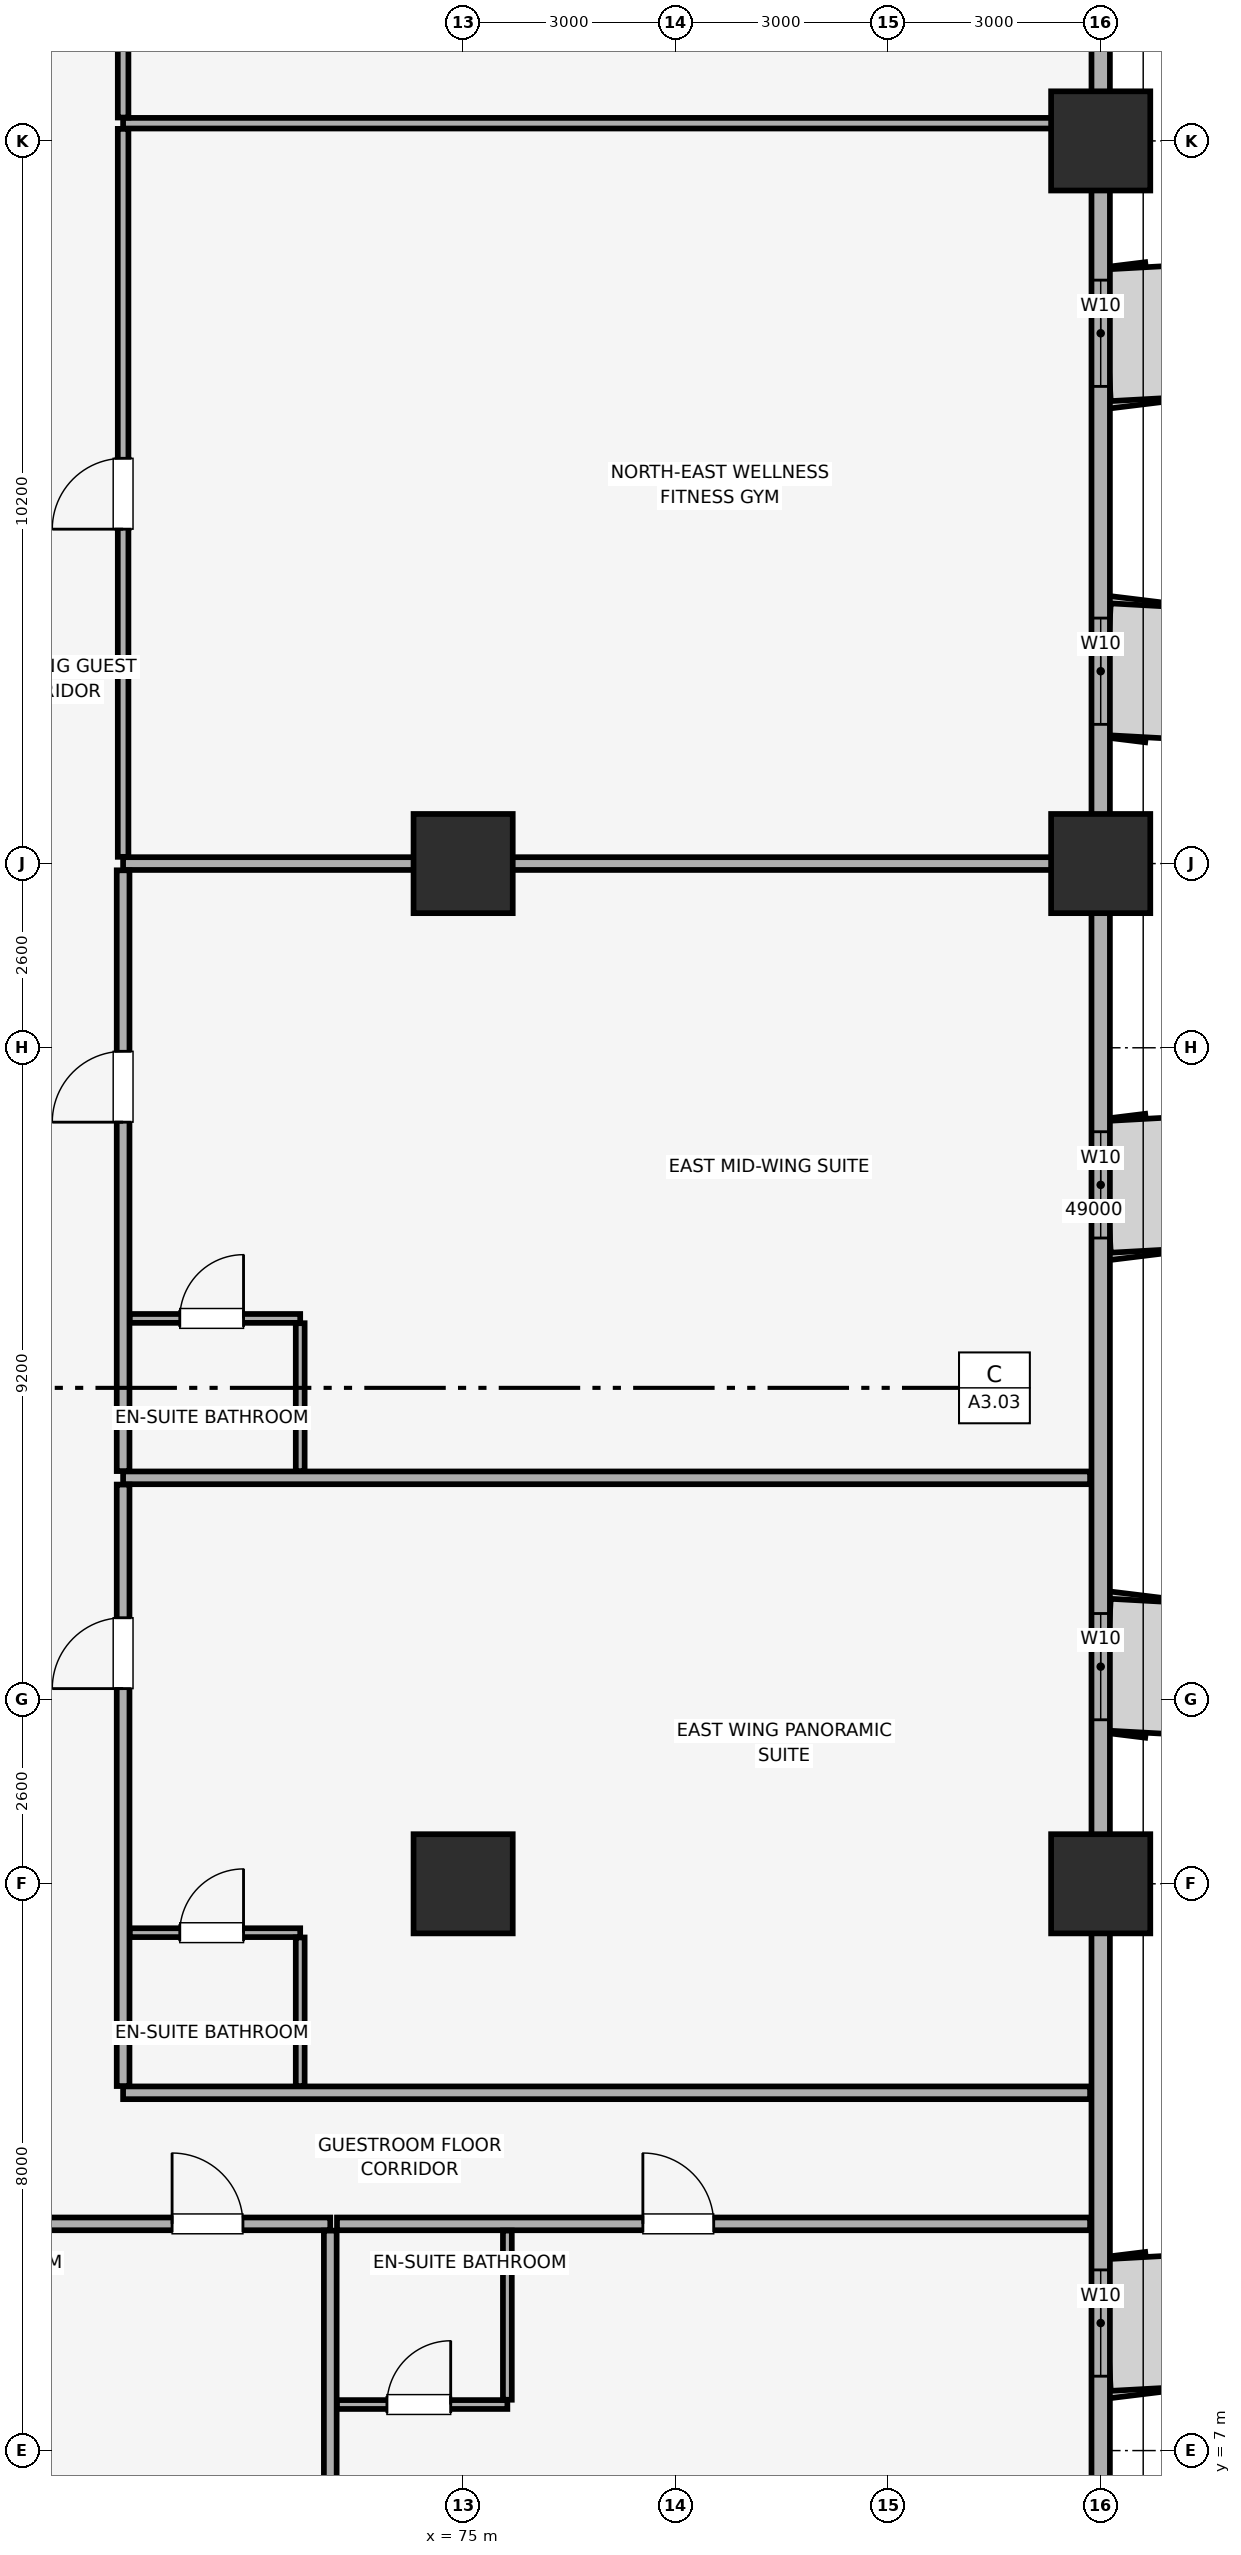
"""IFC4 building model, lengths in metres.
Left out: names, types, materials, properties, quantities, classifications, styles, units other than length and angle.
Written with IfcOpenShell. Run it as: python <this file> out.ifc"""

import sys

from ifc_helpers import new_model, si_unit, direction, frame, frame_2d, origin, origin_2d, place, context, subcontext, project, spatial, rectangle, extrude, element, fill, save


model = new_model("IFC4")
c1 = context("Model", 3, precision=1e-05, world=origin(), true_north=direction((0.0, 1.0)))
c2 = subcontext(c1, "Body", "Model", "MODEL_VIEW")
j1 = project(units=[si_unit("LENGTHUNIT", "METRE"), si_unit("PLANEANGLEUNIT", "RADIAN")], contexts=[c1])
p1 = place(None, origin())
s1 = spatial("IfcSite", under=j1, at=p1, CompositionType="ELEMENT")
p2 = place(p1, origin())
s2 = spatial("IfcBuilding", under=s1, at=p2, CompositionType="ELEMENT")
p3 = place(p2, frame((0.0, 0.0, 46.4)))
s3 = spatial("IfcBuildingStorey", under=s2, at=p3, CompositionType="ELEMENT", Elevation=46.4)
for number, where, z_axis, x_axis in (
    (1, (84.0, 15.0, 0.0), (0.0, 0.0, 1.0), (1.0, 0.0, 0.0)),
    (2, (84.0, 29.4, 0.0), (0.0, 0.0, 1.0), (1.0, 0.0, 0.0)),
    (3, (84.0, 39.6, 0.0), (0.0, 0.0, 1.0), (1.0, 0.0, 0.0)),
    (4, (75.0, 15.0, 0.0), (0.0, 0.0, 1.0), (1.0, 0.0, 0.0)),
    (5, (75.0, 29.4, 0.0), (0.0, 0.0, 1.0), (1.0, 0.0, 0.0)),
):
    element("IfcColumn", number, at=place(p3, frame(where, z_axis=z_axis, x_axis=x_axis)), inside=s3, PredefinedType="COLUMN", context=c2, shape_type="SweptSolid", body=[
        extrude(rectangle(XDim=1.4, YDim=1.4, at=origin_2d()), origin(), (0.0, 0.0, 1.0), 3.51),
    ])
p4 = place(p3, frame((84.0, 4.2, 0.0), z_axis=(0.0, 0.0, 1.0), x_axis=(0.0, 1.0, 0.0)))
e6 = element("IfcWall", 6, at=p4, inside=s3, PredefinedType="SOLIDWALL", context=c2, shape_type="SweptSolid", body=[
    extrude(rectangle(XDim=40.6, YDim=0.26, at=frame_2d((20.3, 0.0))), origin(), (0.0, 0.0, 1.0), 2.56),
])
p5 = place(p4, frame((3.85, 0.0, 0.85)))
e7 = element("IfcOpeningElement", 7, at=p5, cuts=e6, PredefinedType="OPENING", context=c2, shape_type="SweptSolid", body=[
    extrude(rectangle(XDim=1.5, YDim=1.4, at=frame_2d((0.75, 0.7))), frame((0.0, 0.14, 0.0), z_axis=(0.0, -1.0, 0.0), x_axis=(1.0, 0.0, 0.0)), (0.0, 0.0, 1.0), 0.28),
])
p6 = place(p4, frame((13.115, 0.0, 0.85)))
e8 = element("IfcOpeningElement", 8, at=p6, cuts=e6, PredefinedType="OPENING", context=c2, shape_type="SweptSolid", body=[
    extrude(rectangle(XDim=1.5, YDim=1.4, at=frame_2d((0.75, 0.7))), frame((0.0, 0.14, 0.0), z_axis=(0.0, -1.0, 0.0), x_axis=(1.0, 0.0, 0.0)), (0.0, 0.0, 1.0), 0.28),
])
p7 = place(p4, frame((19.915, 0.0, 0.85)))
e9 = element("IfcOpeningElement", 9, at=p7, cuts=e6, PredefinedType="OPENING", context=c2, shape_type="SweptSolid", body=[
    extrude(rectangle(XDim=1.5, YDim=1.4, at=frame_2d((0.75, 0.7))), frame((0.0, 0.14, 0.0), z_axis=(0.0, -1.0, 0.0), x_axis=(1.0, 0.0, 0.0)), (0.0, 0.0, 1.0), 0.28),
])
p8 = place(p4, frame((27.165, 0.0, 0.85)))
e10 = element("IfcOpeningElement", 10, at=p8, cuts=e6, PredefinedType="OPENING", context=c2, shape_type="SweptSolid", body=[
    extrude(rectangle(XDim=1.5, YDim=1.4, at=frame_2d((0.75, 0.7))), frame((0.0, 0.14, 0.0), z_axis=(0.0, -1.0, 0.0), x_axis=(1.0, 0.0, 0.0)), (0.0, 0.0, 1.0), 0.28),
])
p9 = place(p4, frame((31.935, 0.0, 0.85)))
e11 = element("IfcOpeningElement", 11, at=p9, cuts=e6, PredefinedType="OPENING", context=c2, shape_type="SweptSolid", body=[
    extrude(rectangle(XDim=1.5, YDim=1.4, at=frame_2d((0.75, 0.7))), frame((0.0, 0.14, 0.0), z_axis=(0.0, -1.0, 0.0), x_axis=(1.0, 0.0, 0.0)), (0.0, 0.0, 1.0), 0.28),
])
p10 = place(p4, frame((37.365, 0.0, 0.85)))
e12 = element("IfcOpeningElement", 12, at=p10, cuts=e6, PredefinedType="OPENING", context=c2, shape_type="SweptSolid", body=[
    extrude(rectangle(XDim=1.5, YDim=1.4, at=frame_2d((0.75, 0.7))), frame((0.0, 0.14, 0.0), z_axis=(0.0, -1.0, 0.0), x_axis=(1.0, 0.0, 0.0)), (0.0, 0.0, 1.0), 0.28),
])
p11 = place(p3, frame((66.794, 10.2, 0.0), z_axis=(0.0, 0.0, 1.0), x_axis=(1.0, 0.0, 0.0)))
e13 = element("IfcWall", 13, at=p11, inside=s3, PredefinedType="PARTITIONING", context=c2, shape_type="SweptSolid", body=[
    extrude(rectangle(XDim=6.331, YDim=0.18, at=frame_2d((3.165, 0.0))), origin(), (0.0, 0.0, 1.0), 3.51),
])
p12 = place(p11, frame((4.098, 0.0, 0.0)))
e14 = element("IfcOpeningElement", 14, at=p12, cuts=e13, PredefinedType="OPENING", context=c2, shape_type="SweptSolid", body=[
    extrude(rectangle(XDim=1.0, YDim=2.15, at=frame_2d((0.5, 1.075))), frame((0.0, 0.1, 0.0), z_axis=(0.0, -1.0, 0.0), x_axis=(1.0, 0.0, 0.0)), (0.0, 0.0, 1.0), 0.2),
])
p13 = place(p3, frame((73.124, 0.15, 0.0), z_axis=(0.0, 0.0, 1.0), x_axis=(0.0, 1.0, 0.0)))
e15 = element("IfcWall", 15, at=p13, inside=s3, PredefinedType="PARTITIONING", context=c2, shape_type="SweptSolid", body=[
    extrude(rectangle(XDim=9.955, YDim=0.18, at=frame_2d((4.978, 0.0))), origin(), (0.0, 0.0, 1.0), 3.51),
])
p14 = place(p3, frame((73.219, 10.2, 0.0), z_axis=(0.0, 0.0, 1.0), x_axis=(1.0, 0.0, 0.0)))
e16 = element("IfcWall", 16, at=p14, inside=s3, PredefinedType="PARTITIONING", context=c2, shape_type="SweptSolid", body=[
    extrude(rectangle(XDim=10.631, YDim=0.18, at=frame_2d((5.315, 0.0))), origin(), (0.0, 0.0, 1.0), 3.51),
])
p15 = place(p14, frame((4.318, 0.0, 0.0)))
e17 = element("IfcOpeningElement", 17, at=p15, cuts=e16, PredefinedType="OPENING", context=c2, shape_type="SweptSolid", body=[
    extrude(rectangle(XDim=1.0, YDim=2.15, at=frame_2d((0.5, 1.075))), frame((0.0, 0.1, 0.0), z_axis=(0.0, -1.0, 0.0), x_axis=(1.0, 0.0, 0.0)), (0.0, 0.0, 1.0), 0.2),
])
p16 = place(p3, frame((73.219, 7.65, 0.0), z_axis=(0.0, 0.0, 1.0), x_axis=(1.0, 0.0, 0.0)))
e18 = element("IfcWall", 18, at=p16, inside=s3, PredefinedType="PARTITIONING", context=c2, shape_type="SweptSolid", body=[
    extrude(rectangle(XDim=2.405, YDim=0.125, at=frame_2d((1.203, 0.0))), origin(), (0.0, 0.0, 1.0), 3.51),
])
p17 = place(p16, frame((0.705, 0.0, 0.0)))
e19 = element("IfcOpeningElement", 19, at=p17, cuts=e18, PredefinedType="OPENING", context=c2, shape_type="SweptSolid", body=[
    extrude(rectangle(XDim=0.9, YDim=2.1, at=frame_2d((0.45, 1.05))), frame((0.0, 0.073, 0.0), z_axis=(0.0, -1.0, 0.0), x_axis=(1.0, 0.0, 0.0)), (0.0, 0.0, 1.0), 0.145),
])
p18 = place(p3, frame((75.624, 7.718, 0.0), z_axis=(0.0, 0.0, 1.0), x_axis=(0.0, 1.0, 0.0)))
e20 = element("IfcWall", 20, at=p18, inside=s3, PredefinedType="PARTITIONING", context=c2, shape_type="SweptSolid", body=[
    extrude(rectangle(XDim=2.387, YDim=0.125, at=frame_2d((1.194, 0.0))), origin(), (0.0, 0.0, 1.0), 3.51),
])
for number, where, z_axis, x_axis in (
    (21, (70.2, 12.05, 0.0), (0.0, 0.0, 1.0), (1.0, 0.0, 0.0)),
    (22, (70.2, 20.73, 0.0), (0.0, 0.0, 1.0), (1.0, 0.0, 0.0)),
):
    element("IfcWall", number, at=place(p3, frame(where, z_axis=z_axis, x_axis=x_axis)), inside=s3, PredefinedType="PARTITIONING", context=c2, shape_type="SweptSolid", body=[
        extrude(rectangle(XDim=13.65, YDim=0.18, at=frame_2d((6.825, 0.0))), origin(), (0.0, 0.0, 1.0), 3.51),
    ])
p19 = place(p3, frame((70.2, 12.145, 0.0), z_axis=(0.0, 0.0, 1.0), x_axis=(0.0, 1.0, 0.0)))
e23 = element("IfcWall", 23, at=p19, inside=s3, PredefinedType="PARTITIONING", context=c2, shape_type="SweptSolid", body=[
    extrude(rectangle(XDim=8.49, YDim=0.18, at=frame_2d((4.245, 0.0))), origin(), (0.0, 0.0, 1.0), 3.51),
])
p20 = place(p19, frame((5.61, 0.0, 0.0)))
e24 = element("IfcOpeningElement", 24, at=p20, cuts=e23, PredefinedType="OPENING", context=c2, shape_type="SweptSolid", body=[
    extrude(rectangle(XDim=1.0, YDim=2.15, at=frame_2d((0.5, 1.075))), frame((0.0, 0.1, 0.0), z_axis=(0.0, -1.0, 0.0), x_axis=(1.0, 0.0, 0.0)), (0.0, 0.0, 1.0), 0.2),
])
p21 = place(p3, frame((70.295, 14.31, 0.0), z_axis=(0.0, 0.0, 1.0), x_axis=(1.0, 0.0, 0.0)))
e25 = element("IfcWall", 25, at=p21, inside=s3, PredefinedType="PARTITIONING", context=c2, shape_type="SweptSolid", body=[
    extrude(rectangle(XDim=2.405, YDim=0.125, at=frame_2d((1.203, 0.0))), origin(), (0.0, 0.0, 1.0), 3.51),
])
p22 = place(p21, frame((0.705, 0.0, 0.0)))
e26 = element("IfcOpeningElement", 26, at=p22, cuts=e25, PredefinedType="OPENING", context=c2, shape_type="SweptSolid", body=[
    extrude(rectangle(XDim=0.9, YDim=2.1, at=frame_2d((0.45, 1.05))), frame((0.0, 0.073, 0.0), z_axis=(0.0, -1.0, 0.0), x_axis=(1.0, 0.0, 0.0)), (0.0, 0.0, 1.0), 0.145),
])
p23 = place(p3, frame((72.7, 12.145, 0.0), z_axis=(0.0, 0.0, 1.0), x_axis=(0.0, 1.0, 0.0)))
e27 = element("IfcWall", 27, at=p23, inside=s3, PredefinedType="PARTITIONING", context=c2, shape_type="SweptSolid", body=[
    extrude(rectangle(XDim=2.097, YDim=0.125, at=frame_2d((1.049, 0.0))), origin(), (0.0, 0.0, 1.0), 3.51),
])
p24 = place(p3, frame((70.2, 29.4, 0.0), z_axis=(0.0, 0.0, 1.0), x_axis=(1.0, 0.0, 0.0)))
e28 = element("IfcWall", 28, at=p24, inside=s3, PredefinedType="PARTITIONING", context=c2, shape_type="SweptSolid", body=[
    extrude(rectangle(XDim=13.65, YDim=0.18, at=frame_2d((6.825, 0.0))), origin(), (0.0, 0.0, 1.0), 2.86),
])
p25 = place(p3, frame((70.2, 20.825, 0.0), z_axis=(0.0, 0.0, 1.0), x_axis=(0.0, 1.0, 0.0)))
e29 = element("IfcWall", 29, at=p25, inside=s3, PredefinedType="PARTITIONING", context=c2, shape_type="SweptSolid", body=[
    extrude(rectangle(XDim=8.48, YDim=0.18, at=frame_2d((4.24, 0.0))), origin(), (0.0, 0.0, 1.0), 3.51),
])
p26 = place(p25, frame((4.925, 0.0, 0.0)))
e30 = element("IfcOpeningElement", 30, at=p26, cuts=e29, PredefinedType="OPENING", context=c2, shape_type="SweptSolid", body=[
    extrude(rectangle(XDim=1.0, YDim=2.15, at=frame_2d((0.5, 1.075))), frame((0.0, 0.1, 0.0), z_axis=(0.0, -1.0, 0.0), x_axis=(1.0, 0.0, 0.0)), (0.0, 0.0, 1.0), 0.2),
])
p27 = place(p3, frame((70.295, 22.98, 0.0), z_axis=(0.0, 0.0, 1.0), x_axis=(1.0, 0.0, 0.0)))
e31 = element("IfcWall", 31, at=p27, inside=s3, PredefinedType="PARTITIONING", context=c2, shape_type="SweptSolid", body=[
    extrude(rectangle(XDim=2.405, YDim=0.125, at=frame_2d((1.203, 0.0))), origin(), (0.0, 0.0, 1.0), 3.51),
])
p28 = place(p27, frame((0.705, 0.0, 0.0)))
e32 = element("IfcOpeningElement", 32, at=p28, cuts=e31, PredefinedType="OPENING", context=c2, shape_type="SweptSolid", body=[
    extrude(rectangle(XDim=0.9, YDim=2.1, at=frame_2d((0.45, 1.05))), frame((0.0, 0.073, 0.0), z_axis=(0.0, -1.0, 0.0), x_axis=(1.0, 0.0, 0.0)), (0.0, 0.0, 1.0), 0.145),
])
p29 = place(p3, frame((72.7, 20.825, 0.0), z_axis=(0.0, 0.0, 1.0), x_axis=(0.0, 1.0, 0.0)))
e33 = element("IfcWall", 33, at=p29, inside=s3, PredefinedType="PARTITIONING", context=c2, shape_type="SweptSolid", body=[
    extrude(rectangle(XDim=2.088, YDim=0.125, at=frame_2d((1.044, 0.0))), origin(), (0.0, 0.0, 1.0), 3.51),
])
p30 = place(p3, frame((70.2, 39.85, 0.0), z_axis=(0.0, 0.0, 1.0), x_axis=(1.0, 0.0, 0.0)))
e34 = element("IfcWall", 34, at=p30, inside=s3, PredefinedType="PARTITIONING", context=c2, shape_type="SweptSolid", body=[
    extrude(rectangle(XDim=13.65, YDim=0.15, at=frame_2d((6.825, 0.0))), origin(), (0.0, 0.0, 1.0), 3.51),
])
p31 = place(p3, frame((70.2, 29.495, 0.0), z_axis=(0.0, 0.0, 1.0), x_axis=(0.0, 1.0, 0.0)))
e35 = element("IfcWall", 35, at=p31, inside=s3, PredefinedType="PARTITIONING", context=c2, shape_type="SweptSolid", body=[
    extrude(rectangle(XDim=10.275, YDim=0.15, at=frame_2d((5.137, 0.0))), origin(), (0.0, 0.0, 1.0), 3.51),
])
p32 = place(p31, frame((4.625, 0.0, 0.0)))
e36 = element("IfcOpeningElement", 36, at=p32, cuts=e35, PredefinedType="OPENING", context=c2, shape_type="SweptSolid", body=[
    extrude(rectangle(XDim=1.0, YDim=2.15, at=frame_2d((0.5, 1.075))), frame((0.0, 0.085, 0.0), z_axis=(0.0, -1.0, 0.0), x_axis=(1.0, 0.0, 0.0)), (0.0, 0.0, 1.0), 0.17),
])
p33 = place(p3, frame((70.2, 39.93, 0.0), z_axis=(0.0, 0.0, 1.0), x_axis=(0.0, 1.0, 0.0)))
e37 = element("IfcWall", 37, at=p33, inside=s3, PredefinedType="PARTITIONING", context=c2, shape_type="SweptSolid", body=[
    extrude(rectangle(XDim=8.92, YDim=0.15, at=frame_2d((4.46, 0.0))), origin(), (0.0, 0.0, 1.0), 3.51),
])
p34 = place(p33, frame((1.6, 0.0, 0.0)))
e38 = element("IfcOpeningElement", 38, at=p34, cuts=e37, PredefinedType="OPENING", context=c2, shape_type="SweptSolid", body=[
    extrude(rectangle(XDim=1.0, YDim=2.15, at=frame_2d((0.5, 1.075))), frame((0.0, 0.085, 0.0), z_axis=(0.0, -1.0, 0.0), x_axis=(1.0, 0.0, 0.0)), (0.0, 0.0, 1.0), 0.17),
])
p35 = place(p5, origin())
e39 = element("IfcWindow", 39, at=p35, inside=s3, PartitioningType="SINGLE_PANEL", PredefinedType="WINDOW", context=c2, shape_type="SweptSolid", body=[
    extrude(rectangle(XDim=1.5, YDim=1.4, at=frame_2d((0.75, 0.7))), frame((0.0, 0.03, 0.0), z_axis=(0.0, -1.0, 0.0), x_axis=(1.0, 0.0, 0.0)), (0.0, 0.0, 1.0), 0.06),
])
fill(e7, e39)
p36 = place(p6, origin())
e40 = element("IfcWindow", 40, at=p36, inside=s3, PartitioningType="SINGLE_PANEL", PredefinedType="WINDOW", context=c2, shape_type="SweptSolid", body=[
    extrude(rectangle(XDim=1.5, YDim=1.4, at=frame_2d((0.75, 0.7))), frame((0.0, 0.03, 0.0), z_axis=(0.0, -1.0, 0.0), x_axis=(1.0, 0.0, 0.0)), (0.0, 0.0, 1.0), 0.06),
])
fill(e8, e40)
p37 = place(p7, origin())
e41 = element("IfcWindow", 41, at=p37, inside=s3, PartitioningType="SINGLE_PANEL", PredefinedType="WINDOW", context=c2, shape_type="SweptSolid", body=[
    extrude(rectangle(XDim=1.5, YDim=1.4, at=frame_2d((0.75, 0.7))), frame((0.0, 0.03, 0.0), z_axis=(0.0, -1.0, 0.0), x_axis=(1.0, 0.0, 0.0)), (0.0, 0.0, 1.0), 0.06),
])
fill(e9, e41)
p38 = place(p8, origin())
e42 = element("IfcWindow", 42, at=p38, inside=s3, PartitioningType="SINGLE_PANEL", PredefinedType="WINDOW", context=c2, shape_type="SweptSolid", body=[
    extrude(rectangle(XDim=1.5, YDim=1.4, at=frame_2d((0.75, 0.7))), frame((0.0, 0.03, 0.0), z_axis=(0.0, -1.0, 0.0), x_axis=(1.0, 0.0, 0.0)), (0.0, 0.0, 1.0), 0.06),
])
fill(e10, e42)
p39 = place(p9, origin())
e43 = element("IfcWindow", 43, at=p39, inside=s3, PartitioningType="SINGLE_PANEL", PredefinedType="WINDOW", context=c2, shape_type="SweptSolid", body=[
    extrude(rectangle(XDim=1.5, YDim=1.4, at=frame_2d((0.75, 0.7))), frame((0.0, 0.03, 0.0), z_axis=(0.0, -1.0, 0.0), x_axis=(1.0, 0.0, 0.0)), (0.0, 0.0, 1.0), 0.06),
])
fill(e11, e43)
p40 = place(p12, origin())
e44 = element("IfcDoor", 44, at=p40, inside=s3, OperationType="SINGLE_SWING_LEFT", PredefinedType="DOOR", context=c2, shape_type="SweptSolid", body=[
    extrude(rectangle(XDim=1.0, YDim=2.15, at=frame_2d((0.5, 1.075))), frame((0.0, 0.025, 0.0), z_axis=(0.0, -1.0, 0.0), x_axis=(1.0, 0.0, 0.0)), (0.0, 0.0, 1.0), 0.05),
])
fill(e14, e44)
p41 = place(p15, origin())
e45 = element("IfcDoor", 45, at=p41, inside=s3, OperationType="SINGLE_SWING_LEFT", PredefinedType="DOOR", context=c2, shape_type="SweptSolid", body=[
    extrude(rectangle(XDim=1.0, YDim=2.15, at=frame_2d((0.5, 1.075))), frame((0.0, 0.025, 0.0), z_axis=(0.0, -1.0, 0.0), x_axis=(1.0, 0.0, 0.0)), (0.0, 0.0, 1.0), 0.05),
])
fill(e17, e45)
p42 = place(p17, origin())
e46 = element("IfcDoor", 46, at=p42, inside=s3, OperationType="SINGLE_SWING_RIGHT", PredefinedType="DOOR", context=c2, shape_type="SweptSolid", body=[
    extrude(rectangle(XDim=0.9, YDim=2.1, at=frame_2d((0.45, 1.05))), frame((0.0, 0.025, 0.0), z_axis=(0.0, -1.0, 0.0), x_axis=(1.0, 0.0, 0.0)), (0.0, 0.0, 1.0), 0.05),
])
fill(e19, e46)
p43 = place(p20, origin())
e47 = element("IfcDoor", 47, at=p43, inside=s3, OperationType="SINGLE_SWING_LEFT", PredefinedType="DOOR", context=c2, shape_type="SweptSolid", body=[
    extrude(rectangle(XDim=1.0, YDim=2.15, at=frame_2d((0.5, 1.075))), frame((0.0, 0.025, 0.0), z_axis=(0.0, -1.0, 0.0), x_axis=(1.0, 0.0, 0.0)), (0.0, 0.0, 1.0), 0.05),
])
fill(e24, e47)
p44 = place(p22, origin())
e48 = element("IfcDoor", 48, at=p44, inside=s3, OperationType="SINGLE_SWING_RIGHT", PredefinedType="DOOR", context=c2, shape_type="SweptSolid", body=[
    extrude(rectangle(XDim=0.9, YDim=2.1, at=frame_2d((0.45, 1.05))), frame((0.0, 0.025, 0.0), z_axis=(0.0, -1.0, 0.0), x_axis=(1.0, 0.0, 0.0)), (0.0, 0.0, 1.0), 0.05),
])
fill(e26, e48)
p45 = place(p26, origin())
e49 = element("IfcDoor", 49, at=p45, inside=s3, OperationType="SINGLE_SWING_LEFT", PredefinedType="DOOR", context=c2, shape_type="SweptSolid", body=[
    extrude(rectangle(XDim=1.0, YDim=2.15, at=frame_2d((0.5, 1.075))), frame((0.0, 0.025, 0.0), z_axis=(0.0, -1.0, 0.0), x_axis=(1.0, 0.0, 0.0)), (0.0, 0.0, 1.0), 0.05),
])
fill(e30, e49)
p46 = place(p28, origin())
e50 = element("IfcDoor", 50, at=p46, inside=s3, OperationType="SINGLE_SWING_RIGHT", PredefinedType="DOOR", context=c2, shape_type="SweptSolid", body=[
    extrude(rectangle(XDim=0.9, YDim=2.1, at=frame_2d((0.45, 1.05))), frame((0.0, 0.025, 0.0), z_axis=(0.0, -1.0, 0.0), x_axis=(1.0, 0.0, 0.0)), (0.0, 0.0, 1.0), 0.05),
])
fill(e32, e50)
p47 = place(p32, origin())
e51 = element("IfcDoor", 51, at=p47, inside=s3, OperationType="SINGLE_SWING_LEFT", PredefinedType="DOOR", context=c2, shape_type="SweptSolid", body=[
    extrude(rectangle(XDim=1.0, YDim=2.15, at=frame_2d((0.5, 1.075))), frame((0.0, 0.025, 0.0), z_axis=(0.0, -1.0, 0.0), x_axis=(1.0, 0.0, 0.0)), (0.0, 0.0, 1.0), 0.05),
])
fill(e36, e51)
save(model, sys.argv[1])
